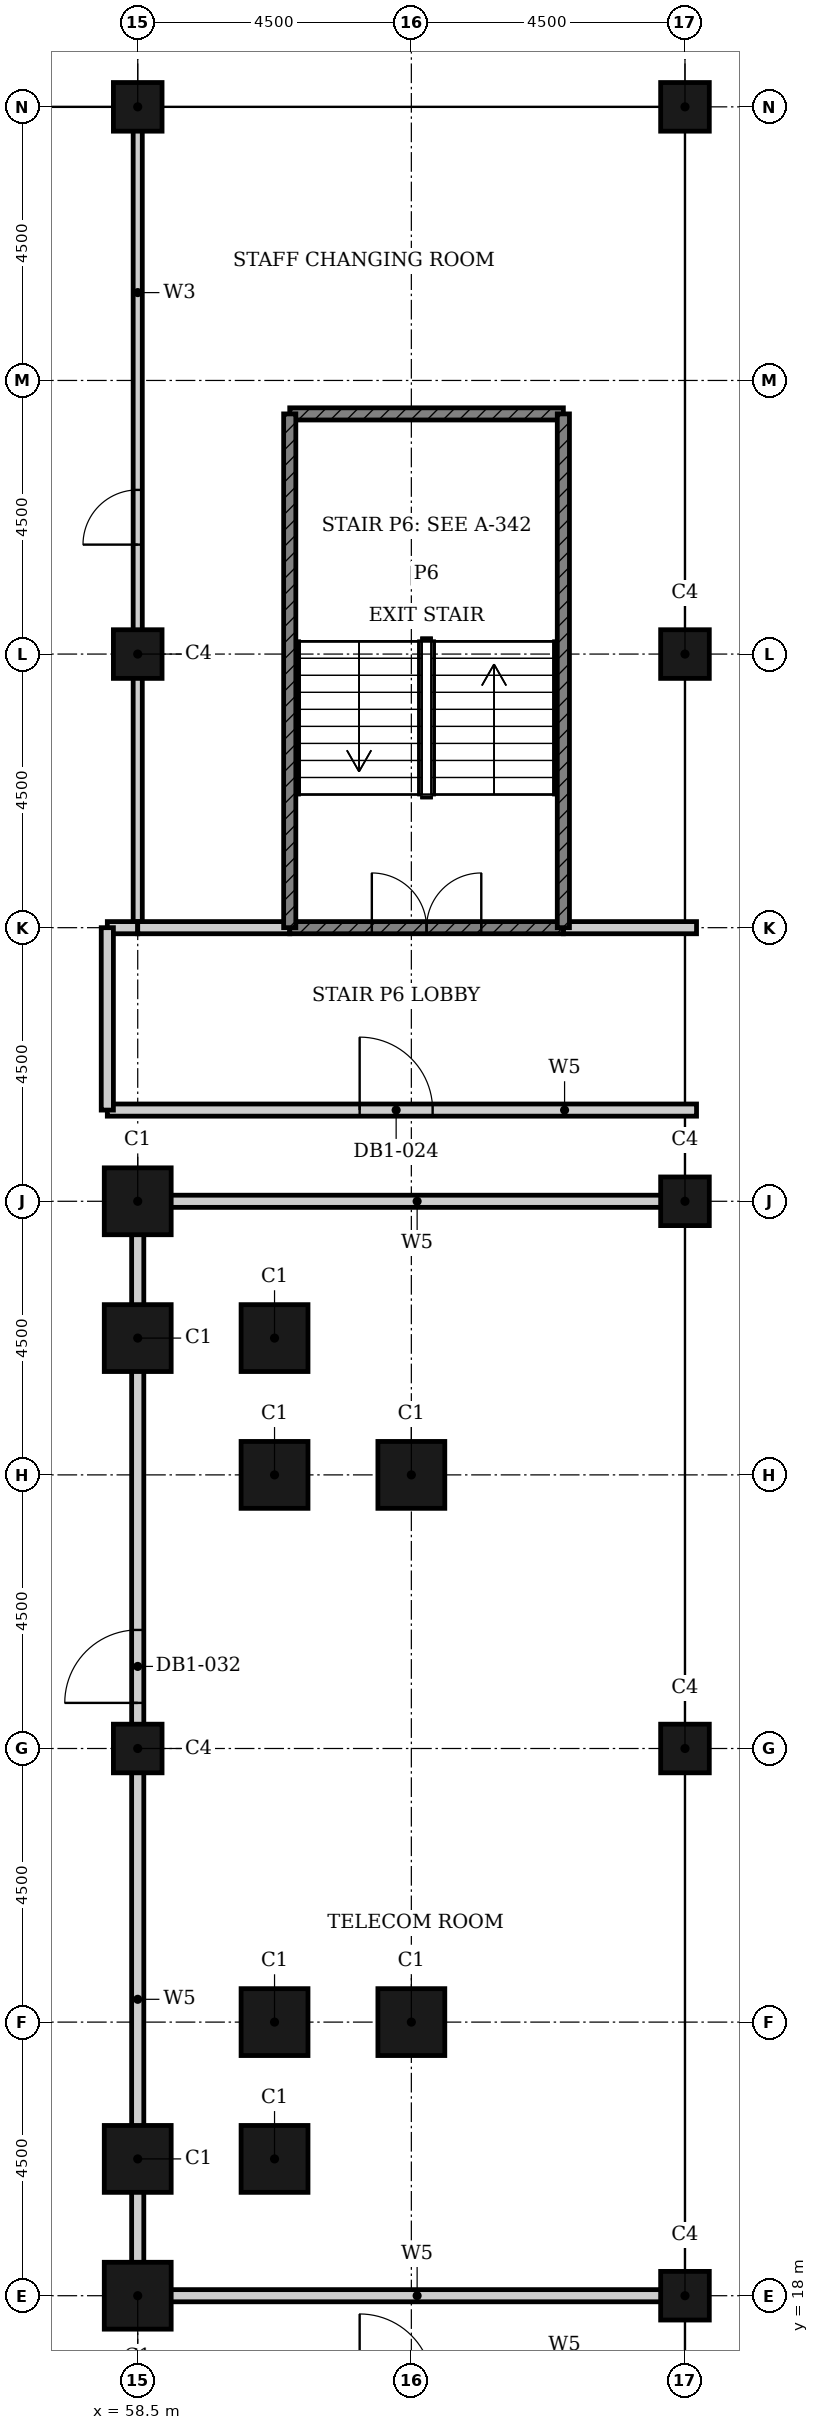
"""IFC4 building model, lengths in metres.
Left out: names, types, materials, properties, quantities, classifications, styles, units other than length and angle.
Written with IfcOpenShell. Run it as: python <this file> out.ifc"""

import sys

from ifc_helpers import new_model, si_unit, direction, frame, frame_2d, origin, origin_2d, place, context, subcontext, project, spatial, rectangle, hollow_rectangle, extrude, element, fill, save


model = new_model("IFC4")
c1 = context("Model", 3, precision=1e-05, world=origin(), true_north=direction((0.0, 1.0)))
c2 = subcontext(c1, "Body", "Model", "MODEL_VIEW")
j1 = project(units=[si_unit("LENGTHUNIT", "METRE"), si_unit("PLANEANGLEUNIT", "RADIAN")], contexts=[c1])
p1 = place(None, origin())
s1 = spatial("IfcSite", under=j1, at=p1, CompositionType="ELEMENT")
p2 = place(p1, origin())
s2 = spatial("IfcBuilding", under=s1, at=p2, CompositionType="ELEMENT")
p3 = place(p2, frame((0.0, 0.0, -6.0)))
s3 = spatial("IfcBuildingStorey", under=s2, at=p3, CompositionType="ELEMENT", Elevation=-6.0)
for number, where, z_axis, x_axis in (
    (1, (58.5, 18.0, -0.5), (0.0, 0.0, 1.0), (1.0, 0.0, 0.0)),
    (2, (58.5, 20.25, -0.5), (0.0, 0.0, 1.0), (1.0, 0.0, 0.0)),
    (3, (60.75, 20.25, -0.5), (0.0, 0.0, 1.0), (1.0, 0.0, 0.0)),
    (4, (60.75, 22.5, -0.5), (0.0, 0.0, 1.0), (1.0, 0.0, 0.0)),
    (5, (63.0, 22.5, -0.5), (0.0, 0.0, 1.0), (1.0, 0.0, 0.0)),
    (6, (63.0, 31.5, -0.5), (0.0, 0.0, 1.0), (1.0, 0.0, 0.0)),
    (7, (60.75, 31.5, -0.5), (0.0, 0.0, 1.0), (1.0, 0.0, 0.0)),
    (8, (60.75, 33.75, -0.5), (0.0, 0.0, 1.0), (1.0, 0.0, 0.0)),
    (9, (58.5, 33.75, -0.5), (0.0, 0.0, 1.0), (1.0, 0.0, 0.0)),
    (10, (58.5, 36.0, -0.5), (0.0, 0.0, 1.0), (1.0, 0.0, 0.0)),
):
    element("IfcColumn", number, at=place(p3, frame(where, z_axis=z_axis, x_axis=x_axis)), inside=s3, PredefinedType="COLUMN", context=c2, shape_type="SweptSolid", body=[
        extrude(hollow_rectangle(XDim=1.1, YDim=1.1, WallThickness=0.036, at=origin_2d()), origin(), (0.0, 0.0, 1.0), 6.5),
    ])
for number, where, z_axis, x_axis in (
    (11, (58.5, 54.0, -0.5), (0.0, 0.0, 1.0), (1.0, 0.0, 0.0)),
    (12, (67.5, 18.0, -0.5), (0.0, 0.0, 1.0), (1.0, 0.0, 0.0)),
    (13, (67.5, 27.0, -0.5), (0.0, 0.0, 1.0), (1.0, 0.0, 0.0)),
    (14, (67.5, 36.0, -0.5), (0.0, 0.0, 1.0), (1.0, 0.0, 0.0)),
    (15, (67.5, 45.0, -0.5), (0.0, 0.0, 1.0), (1.0, 0.0, 0.0)),
    (16, (67.5, 54.0, -0.5), (0.0, 0.0, 1.0), (1.0, 0.0, 0.0)),
    (17, (58.5, 27.0, -0.5), (0.0, 0.0, 1.0), (1.0, 0.0, 0.0)),
    (18, (58.5, 45.0, -0.5), (0.0, 0.0, 1.0), (1.0, 0.0, 0.0)),
):
    element("IfcColumn", number, at=place(p3, frame(where, z_axis=z_axis, x_axis=x_axis)), inside=s3, PredefinedType="COLUMN", context=c2, shape_type="SweptSolid", body=[
        extrude(hollow_rectangle(XDim=0.8, YDim=0.8, WallThickness=0.025, at=origin_2d()), origin(), (0.0, 0.0, 1.0), 6.5),
    ])
p4 = place(p3, frame((58.5, 40.5, 0.0), z_axis=(0.0, 0.0, 1.0), x_axis=(0.0, 1.0, 0.0)))
e19 = element("IfcWall", 19, at=p4, inside=s3, PredefinedType="PARTITIONING", context=c2, shape_type="SweptSolid", body=[
    extrude(rectangle(XDim=13.69, YDim=0.15, at=frame_2d((6.845, 0.0))), origin(), (0.0, 0.0, 1.0), 5.6),
])
p5 = place(p4, frame((6.3, 0.0, 0.0)))
e20 = element("IfcOpeningElement", 20, at=p5, cuts=e19, PredefinedType="OPENING", context=c2, shape_type="SweptSolid", body=[
    extrude(rectangle(XDim=0.9, YDim=2.1, at=frame_2d((0.45, 1.05))), frame((0.0, 0.085, 0.0), z_axis=(0.0, -1.0, 0.0), x_axis=(1.0, 0.0, 0.0)), (0.0, 0.0, 1.0), 0.17),
])
for number, where, z_axis, x_axis in (
    (21, (58.5, 18.0, 0.0), (0.0, 0.0, 1.0), (1.0, 0.0, 0.0)),
    (22, (58.5, 36.0, 0.0), (0.0, 0.0, 1.0), (1.0, 0.0, 0.0)),
):
    element("IfcWall", number, at=place(p3, frame(where, z_axis=z_axis, x_axis=x_axis)), inside=s3, PredefinedType="PARTITIONING", context=c2, shape_type="SweptSolid", body=[
        extrude(rectangle(XDim=9.19, YDim=0.2, at=frame_2d((4.595, 0.0))), origin(), (0.0, 0.0, 1.0), 5.6),
    ])
p6 = place(p3, frame((58.0, 37.5, 0.0), z_axis=(0.0, 0.0, 1.0), x_axis=(1.0, 0.0, 0.0)))
e23 = element("IfcWall", 23, at=p6, inside=s3, PredefinedType="PARTITIONING", context=c2, shape_type="SweptSolid", body=[
    extrude(rectangle(XDim=9.69, YDim=0.2, at=frame_2d((4.845, 0.0))), origin(), (0.0, 0.0, 1.0), 5.6),
])
p7 = place(p6, frame((4.15, 0.0, 0.0)))
e24 = element("IfcOpeningElement", 24, at=p7, cuts=e23, PredefinedType="OPENING", context=c2, shape_type="SweptSolid", body=[
    extrude(rectangle(XDim=1.2, YDim=2.1, at=frame_2d((0.6, 1.05))), frame((0.0, 0.11, 0.0), z_axis=(0.0, -1.0, 0.0), x_axis=(1.0, 0.0, 0.0)), (0.0, 0.0, 1.0), 0.22),
])
p8 = place(p3, frame((58.0, 40.5, 0.0), z_axis=(0.0, 0.0, 1.0), x_axis=(1.0, 0.0, 0.0)))
e25 = element("IfcWall", 25, at=p8, inside=s3, PredefinedType="PARTITIONING", context=c2, shape_type="SweptSolid", body=[
    extrude(rectangle(XDim=0.5, YDim=0.2, at=frame_2d((0.25, 0.0))), origin(), (0.0, 0.0, 1.0), 5.6),
])
p9 = place(p3, frame((58.5, 40.5, 0.0), z_axis=(0.0, 0.0, 1.0), x_axis=(1.0, 0.0, 0.0)))
e26 = element("IfcWall", 26, at=p9, inside=s3, PredefinedType="PARTITIONING", context=c2, shape_type="SweptSolid", body=[
    extrude(rectangle(XDim=2.5, YDim=0.2, at=frame_2d((1.25, 0.0))), origin(), (0.0, 0.0, 1.0), 5.6),
])
p10 = place(p3, frame((65.5, 40.5, 0.0), z_axis=(0.0, 0.0, 1.0), x_axis=(1.0, 0.0, 0.0)))
e27 = element("IfcWall", 27, at=p10, inside=s3, PredefinedType="PARTITIONING", context=c2, shape_type="SweptSolid", body=[
    extrude(rectangle(XDim=2.19, YDim=0.2, at=frame_2d((1.095, 0.0))), origin(), (0.0, 0.0, 1.0), 5.6),
])
p11 = place(p3, frame((58.0, 37.5, 0.0), z_axis=(0.0, 0.0, 1.0), x_axis=(0.0, 1.0, 0.0)))
e28 = element("IfcWall", 28, at=p11, inside=s3, PredefinedType="PARTITIONING", context=c2, shape_type="SweptSolid", body=[
    extrude(rectangle(XDim=3.0, YDim=0.2, at=frame_2d((1.5, 0.0))), origin(), (0.0, 0.0, 1.0), 5.6),
])
p12 = place(p3, frame((58.5, 18.0, 0.0), z_axis=(0.0, 0.0, 1.0), x_axis=(0.0, 1.0, 0.0)))
e29 = element("IfcWall", 29, at=p12, inside=s3, PredefinedType="PARTITIONING", context=c2, shape_type="SweptSolid", body=[
    extrude(rectangle(XDim=18.0, YDim=0.2, at=frame_2d((9.0, 0.0))), origin(), (0.0, 0.0, 1.0), 5.6),
])
p13 = place(p12, frame((9.75, 0.0, 0.0)))
e30 = element("IfcOpeningElement", 30, at=p13, cuts=e29, PredefinedType="OPENING", context=c2, shape_type="SweptSolid", body=[
    extrude(rectangle(XDim=1.2, YDim=2.1, at=frame_2d((0.6, 1.05))), frame((0.0, 0.11, 0.0), z_axis=(0.0, -1.0, 0.0), x_axis=(1.0, 0.0, 0.0)), (0.0, 0.0, 1.0), 0.22),
])
p14 = place(p3, frame((61.0, 40.5, 0.0), z_axis=(0.0, 0.0, 1.0), x_axis=(1.0, 0.0, 0.0)))
e31 = element("IfcWall", 31, at=p14, inside=s3, PredefinedType="SHEAR", context=c2, shape_type="SweptSolid", body=[
    extrude(rectangle(XDim=4.5, YDim=0.2, at=frame_2d((2.25, 0.0))), origin(), (0.0, 0.0, 1.0), 5.6),
])
p15 = place(p14, frame((1.35, 0.0, 0.0)))
e32 = element("IfcOpeningElement", 32, at=p15, cuts=e31, PredefinedType="OPENING", context=c2, shape_type="SweptSolid", body=[
    extrude(rectangle(XDim=1.8, YDim=2.1, at=frame_2d((0.9, 1.05))), frame((0.0, 0.11, 0.0), z_axis=(0.0, -1.0, 0.0), x_axis=(1.0, 0.0, 0.0)), (0.0, 0.0, 1.0), 0.22),
])
p16 = place(p3, frame((61.0, 48.95, 0.0), z_axis=(0.0, 0.0, 1.0), x_axis=(1.0, 0.0, 0.0)))
e33 = element("IfcWall", 33, at=p16, inside=s3, PredefinedType="SHEAR", context=c2, shape_type="SweptSolid", body=[
    extrude(rectangle(XDim=4.5, YDim=0.2, at=frame_2d((2.25, 0.0))), origin(), (0.0, 0.0, 1.0), 5.6),
])
for number, where, z_axis, x_axis in (
    (34, (61.0, 40.5, 0.0), (0.0, 0.0, 1.0), (0.0, 1.0, 0.0)),
    (35, (65.5, 40.5, 0.0), (0.0, 0.0, 1.0), (0.0, 1.0, 0.0)),
):
    element("IfcWall", number, at=place(p3, frame(where, z_axis=z_axis, x_axis=x_axis)), inside=s3, PredefinedType="SHEAR", context=c2, shape_type="SweptSolid", body=[
        extrude(rectangle(XDim=8.45, YDim=0.2, at=frame_2d((4.225, 0.0))), origin(), (0.0, 0.0, 1.0), 5.6),
    ])
p17 = place(p7, origin())
e36 = element("IfcDoor", 36, at=p17, inside=s3, OperationType="SINGLE_SWING_RIGHT", PredefinedType="DOOR", context=c2, shape_type="SweptSolid", body=[
    extrude(rectangle(XDim=1.2, YDim=2.1, at=frame_2d((0.6, 1.05))), frame((0.0, 0.025, 0.0), z_axis=(0.0, -1.0, 0.0), x_axis=(1.0, 0.0, 0.0)), (0.0, 0.0, 1.0), 0.05),
])
fill(e24, e36)
p18 = place(p15, origin())
e37 = element("IfcDoor", 37, at=p18, inside=s3, OperationType="DOUBLE_DOOR_SINGLE_SWING", PredefinedType="DOOR", context=c2, shape_type="SweptSolid", body=[
    extrude(rectangle(XDim=1.8, YDim=2.1, at=frame_2d((0.9, 1.05))), frame((0.0, 0.025, 0.0), z_axis=(0.0, -1.0, 0.0), x_axis=(1.0, 0.0, 0.0)), (0.0, 0.0, 1.0), 0.05),
])
fill(e32, e37)
p19 = place(p13, origin())
e38 = element("IfcDoor", 38, at=p19, inside=s3, OperationType="SINGLE_SWING_RIGHT", PredefinedType="DOOR", context=c2, shape_type="SweptSolid", body=[
    extrude(rectangle(XDim=1.2, YDim=2.1, at=frame_2d((0.6, 1.05))), frame((0.0, 0.025, 0.0), z_axis=(0.0, -1.0, 0.0), x_axis=(1.0, 0.0, 0.0)), (0.0, 0.0, 1.0), 0.05),
])
fill(e30, e38)
p20 = place(p5, origin())
e39 = element("IfcDoor", 39, at=p20, inside=s3, OperationType="SINGLE_SWING_LEFT", PredefinedType="DOOR", context=c2, shape_type="SweptSolid", body=[
    extrude(rectangle(XDim=0.9, YDim=2.1, at=frame_2d((0.45, 1.05))), frame((0.0, 0.025, 0.0), z_axis=(0.0, -1.0, 0.0), x_axis=(1.0, 0.0, 0.0)), (0.0, 0.0, 1.0), 0.05),
])
fill(e20, e39)
save(model, sys.argv[1])
